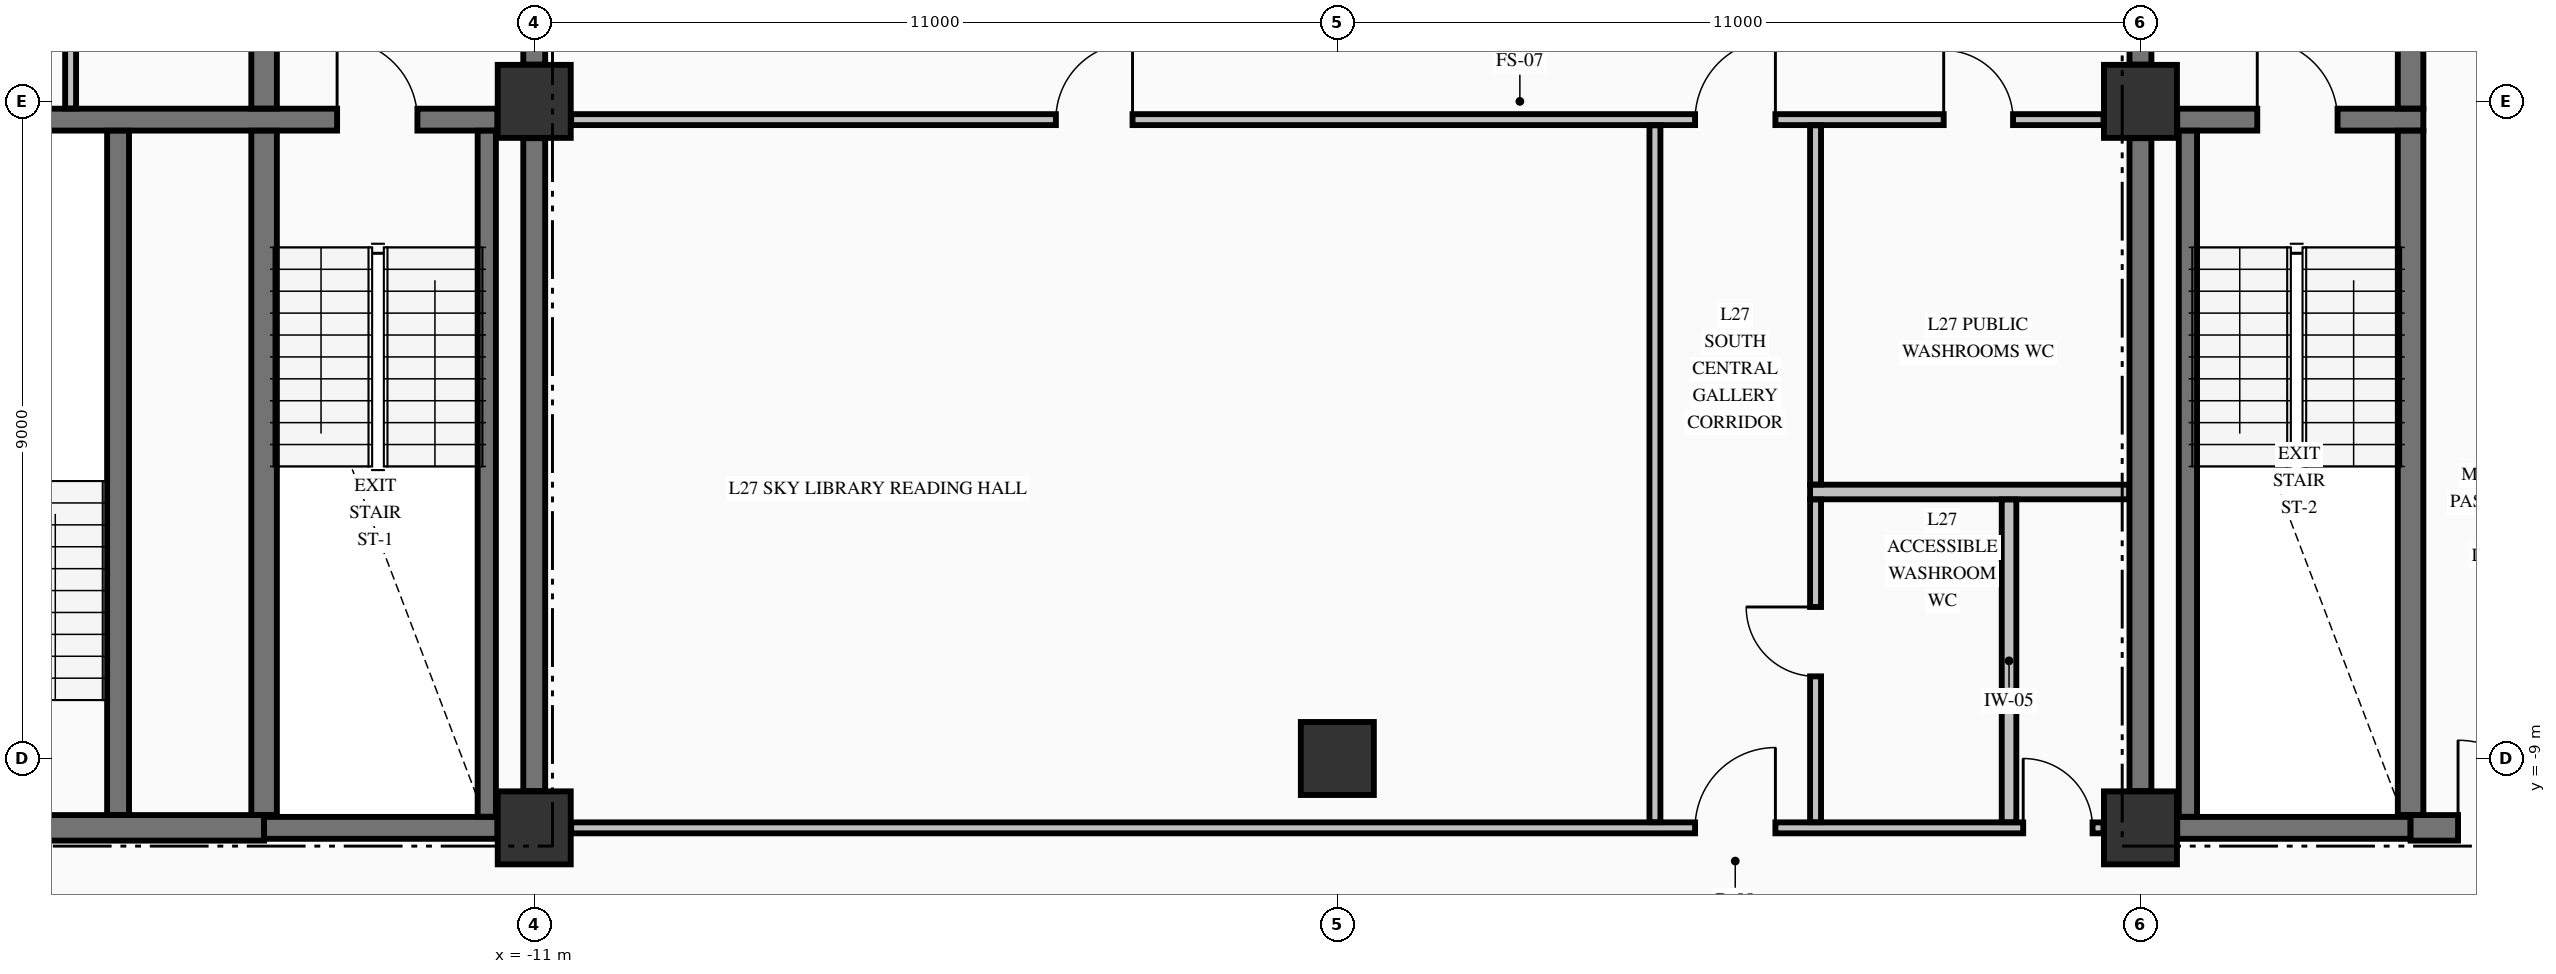
"""IFC4 building model, lengths in metres.
Left out: names, types, materials, properties, quantities, classifications, styles, units other than length and angle.
Written with IfcOpenShell. Run it as: python <this file> out.ifc"""

import sys

from ifc_helpers import new_model, si_unit, direction, frame, frame_2d, origin, origin_2d, place, context, subcontext, project, spatial, rectangle, extrude, element, fill, save


model = new_model("IFC4")
c1 = context("Model", 3, precision=1e-05, world=origin(), true_north=direction((0.0, 1.0)))
c2 = subcontext(c1, "Body", "Model", "MODEL_VIEW")
j1 = project(units=[si_unit("LENGTHUNIT", "METRE"), si_unit("PLANEANGLEUNIT", "RADIAN")], contexts=[c1])
p1 = place(None, origin())
s1 = spatial("IfcSite", under=j1, at=p1, CompositionType="ELEMENT")
p2 = place(p1, origin())
s2 = spatial("IfcBuilding", under=s1, at=p2, CompositionType="ELEMENT")
p3 = place(p2, frame((0.0, 0.0, 109.21)))
s3 = spatial("IfcBuildingStorey", under=s2, at=p3, CompositionType="ELEMENT", Elevation=109.21)
for number, where, z_axis, x_axis in (
    (1, (-11.0, -9.95, -0.25), (0.0, 0.0, 1.0), (1.0, 0.0, 0.0)),
    (2, (-11.0, 0.0, -0.25), (0.0, 0.0, 1.0), (1.0, 0.0, 0.0)),
    (3, (11.0, -9.95, -0.25), (0.0, 0.0, 1.0), (1.0, 0.0, 0.0)),
    (4, (11.0, 0.0, -0.25), (0.0, 0.0, 1.0), (1.0, 0.0, 0.0)),
    (5, (0.0, -9.0, -0.25), (0.0, 0.0, 1.0), (1.0, 0.0, 0.0)),
):
    element("IfcColumn", number, at=place(p3, frame(where, z_axis=z_axis, x_axis=x_axis)), inside=s3, PredefinedType="COLUMN", context=c2, shape_type="SweptSolid", body=[
        extrude(rectangle(XDim=1.0, YDim=1.0, at=origin_2d()), origin(), (0.0, 0.0, 1.0), 3.57),
    ])
p4 = place(p3, frame((-19.496, -9.95, 0.0), z_axis=(0.0, 0.0, 1.0), x_axis=(1.0, 0.0, 0.0)))
e6 = element("IfcWall", 6, at=p4, inside=s3, PredefinedType="SHEAR", context=c2, shape_type="SweptSolid", body=[
    extrude(rectangle(XDim=4.796, YDim=0.35, at=frame_2d((2.398, 0.0))), origin(), (0.0, 0.0, 1.0), 3.32),
])
p5 = place(p4, frame((0.671, 0.0, 0.0)))
e7 = element("IfcOpeningElement", 7, at=p5, cuts=e6, PredefinedType="OPENING", context=c2, shape_type="SweptSolid", body=[
    extrude(rectangle(XDim=1.05, YDim=2.15, at=frame_2d((0.525, 1.075))), frame((0.0, 0.185, 0.0), z_axis=(0.0, -1.0, 0.0), x_axis=(1.0, 0.0, 0.0)), (0.0, 0.0, 1.0), 0.37),
])
for number, where, z_axis, x_axis in (
    (8, (-14.7, -9.95, 0.0), (0.0, 0.0, 1.0), (1.0, 0.0, 0.0)),
    (9, (11.504, -9.95, 0.0), (0.0, 0.0, 1.0), (1.0, 0.0, 0.0)),
):
    element("IfcWall", number, at=place(p3, frame(where, z_axis=z_axis, x_axis=x_axis)), inside=s3, PredefinedType="SHEAR", context=c2, shape_type="SweptSolid", body=[
        extrude(rectangle(XDim=3.196, YDim=0.3, at=frame_2d((1.598, 0.0))), origin(), (0.0, 0.0, 1.0), 3.32),
    ])
p6 = place(p3, frame((14.7, -9.95, 0.0), z_axis=(0.0, 0.0, 1.0), x_axis=(1.0, 0.0, 0.0)))
e10 = element("IfcWall", 10, at=p6, inside=s3, PredefinedType="SHEAR", context=c2, shape_type="SweptSolid", body=[
    extrude(rectangle(XDim=4.796, YDim=0.35, at=frame_2d((2.398, 0.0))), origin(), (0.0, 0.0, 1.0), 3.32),
])
p7 = place(p6, frame((0.65, 0.0, 0.0)))
e11 = element("IfcOpeningElement", 11, at=p7, cuts=e10, PredefinedType="OPENING", context=c2, shape_type="SweptSolid", body=[
    extrude(rectangle(XDim=1.2, YDim=2.15, at=frame_2d((0.6, 1.075))), frame((0.0, 0.185, 0.0), z_axis=(0.0, -1.0, 0.0), x_axis=(1.0, 0.0, 0.0)), (0.0, 0.0, 1.0), 0.37),
])
p8 = place(p3, frame((-19.496, -0.25, 0.0), z_axis=(0.0, 0.0, 1.0), x_axis=(1.0, 0.0, 0.0)))
e12 = element("IfcWall", 12, at=p8, inside=s3, PredefinedType="SHEAR", context=c2, shape_type="SweptSolid", body=[
    extrude(rectangle(XDim=7.992, YDim=0.3, at=frame_2d((3.996, 0.0))), origin(), (0.0, 0.0, 1.0), 3.32),
])
p9 = place(p8, frame((5.796, 0.0, 0.0)))
e13 = element("IfcOpeningElement", 13, at=p9, cuts=e12, PredefinedType="OPENING", context=c2, shape_type="SweptSolid", body=[
    extrude(rectangle(XDim=1.1, YDim=2.15, at=frame_2d((0.55, 1.075))), frame((0.0, 0.16, 0.0), z_axis=(0.0, -1.0, 0.0), x_axis=(1.0, 0.0, 0.0)), (0.0, 0.0, 1.0), 0.32),
])
p10 = place(p3, frame((11.504, -0.25, 0.0), z_axis=(0.0, 0.0, 1.0), x_axis=(1.0, 0.0, 0.0)))
e14 = element("IfcWall", 14, at=p10, inside=s3, PredefinedType="SHEAR", context=c2, shape_type="SweptSolid", body=[
    extrude(rectangle(XDim=3.371, YDim=0.3, at=frame_2d((1.686, 0.0))), origin(), (0.0, 0.0, 1.0), 3.32),
])
p11 = place(p10, frame((1.096, 0.0, 0.0)))
e15 = element("IfcOpeningElement", 15, at=p11, cuts=e14, PredefinedType="OPENING", context=c2, shape_type="SweptSolid", body=[
    extrude(rectangle(XDim=1.1, YDim=2.15, at=frame_2d((0.55, 1.075))), frame((0.0, 0.16, 0.0), z_axis=(0.0, -1.0, 0.0), x_axis=(1.0, 0.0, 0.0)), (0.0, 0.0, 1.0), 0.32),
])
p12 = place(p3, frame((-10.494, -9.95, 0.0), z_axis=(0.0, 0.0, 1.0), x_axis=(1.0, 0.0, 0.0)))
e16 = element("IfcWall", 16, at=p12, inside=s3, PredefinedType="PARTITIONING", context=c2, shape_type="SweptSolid", body=[
    extrude(rectangle(XDim=20.988, YDim=0.15, at=frame_2d((10.494, 0.0))), origin(), (0.0, 0.0, 1.0), 3.32),
])
p13 = place(p12, frame((15.394, 0.0, 0.0)))
e17 = element("IfcOpeningElement", 17, at=p13, cuts=e16, PredefinedType="OPENING", context=c2, shape_type="SweptSolid", body=[
    extrude(rectangle(XDim=1.1, YDim=2.15, at=frame_2d((0.55, 1.075))), frame((0.0, 0.085, 0.0), z_axis=(0.0, -1.0, 0.0), x_axis=(1.0, 0.0, 0.0)), (0.0, 0.0, 1.0), 0.17),
])
p14 = place(p12, frame((19.888, 0.0, 0.0)))
e18 = element("IfcOpeningElement", 18, at=p14, cuts=e16, PredefinedType="OPENING", context=c2, shape_type="SweptSolid", body=[
    extrude(rectangle(XDim=0.95, YDim=2.15, at=frame_2d((0.475, 1.075))), frame((0.0, 0.085, 0.0), z_axis=(0.0, -1.0, 0.0), x_axis=(1.0, 0.0, 0.0)), (0.0, 0.0, 1.0), 0.17),
])
p15 = place(p3, frame((6.475, -5.35, 0.0), z_axis=(0.0, 0.0, 1.0), x_axis=(1.0, 0.0, 0.0)))
e19 = element("IfcWall", 19, at=p15, inside=s3, PredefinedType="PARTITIONING", context=c2, shape_type="SweptSolid", body=[
    extrude(rectangle(XDim=4.372, YDim=0.2, at=frame_2d((2.186, 0.0))), origin(), (0.0, 0.0, 1.0), 3.32),
])
p16 = place(p3, frame((-10.494, -0.25, 0.0), z_axis=(0.0, 0.0, 1.0), x_axis=(1.0, 0.0, 0.0)))
e20 = element("IfcWall", 20, at=p16, inside=s3, PredefinedType="PARTITIONING", context=c2, shape_type="SweptSolid", body=[
    extrude(rectangle(XDim=20.988, YDim=0.15, at=frame_2d((10.494, 0.0))), origin(), (0.0, 0.0, 1.0), 3.32),
])
p17 = place(p16, frame((15.394, 0.0, 0.0)))
e21 = element("IfcOpeningElement", 21, at=p17, cuts=e20, PredefinedType="OPENING", context=c2, shape_type="SweptSolid", body=[
    extrude(rectangle(XDim=1.1, YDim=2.15, at=frame_2d((0.55, 1.075))), frame((0.0, 0.085, 0.0), z_axis=(0.0, -1.0, 0.0), x_axis=(1.0, 0.0, 0.0)), (0.0, 0.0, 1.0), 0.17),
])
p18 = place(p16, frame((6.639, 0.0, 0.0)))
e22 = element("IfcOpeningElement", 22, at=p18, cuts=e20, PredefinedType="OPENING", context=c2, shape_type="SweptSolid", body=[
    extrude(rectangle(XDim=1.05, YDim=2.15, at=frame_2d((0.525, 1.075))), frame((0.0, 0.085, 0.0), z_axis=(0.0, -1.0, 0.0), x_axis=(1.0, 0.0, 0.0)), (0.0, 0.0, 1.0), 0.17),
])
p19 = place(p16, frame((18.799, 0.0, 0.0)))
e23 = element("IfcOpeningElement", 23, at=p19, cuts=e20, PredefinedType="OPENING", context=c2, shape_type="SweptSolid", body=[
    extrude(rectangle(XDim=0.95, YDim=2.15, at=frame_2d((0.475, 1.075))), frame((0.0, 0.085, 0.0), z_axis=(0.0, -1.0, 0.0), x_axis=(1.0, 0.0, 0.0)), (0.0, 0.0, 1.0), 0.17),
])
p20 = place(p3, frame((-16.7, -9.773, 0.0), z_axis=(0.0, 0.0, 1.0), x_axis=(0.0, 1.0, 0.0)))
e24 = element("IfcWall", 24, at=p20, inside=s3, PredefinedType="SHEAR", context=c2, shape_type="SweptSolid", body=[
    extrude(rectangle(XDim=9.371, YDim=0.3, at=frame_2d((4.686, 0.0))), origin(), (0.0, 0.0, 1.0), 3.32),
])
p21 = place(p3, frame((-14.7, -9.773, 0.0), z_axis=(0.0, 0.0, 1.0), x_axis=(0.0, 1.0, 0.0)))
e25 = element("IfcWall", 25, at=p21, inside=s3, PredefinedType="SHEAR", context=c2, shape_type="SweptSolid", body=[
    extrude(rectangle(XDim=9.371, YDim=0.35, at=frame_2d((4.686, 0.0))), origin(), (0.0, 0.0, 1.0), 3.32),
])
p22 = place(p3, frame((-14.7, -0.098, 0.0), z_axis=(0.0, 0.0, 1.0), x_axis=(0.0, 1.0, 0.0)))
e26 = element("IfcWall", 26, at=p22, inside=s3, PredefinedType="SHEAR", context=c2, shape_type="SweptSolid", body=[
    extrude(rectangle(XDim=2.846, YDim=0.35, at=frame_2d((1.423, 0.0))), origin(), (0.0, 0.0, 1.0), 3.32),
])
p23 = place(p3, frame((-11.65, -9.798, 0.0), z_axis=(0.0, 0.0, 1.0), x_axis=(0.0, 1.0, 0.0)))
e27 = element("IfcWall", 27, at=p23, inside=s3, PredefinedType="SOLIDWALL", context=c2, shape_type="SweptSolid", body=[
    extrude(rectangle(XDim=9.396, YDim=0.25, at=frame_2d((4.698, 0.0))), origin(), (0.0, 0.0, 1.0), 3.32),
])
p24 = place(p3, frame((-11.0, -9.446, 0.0), z_axis=(0.0, 0.0, 1.0), x_axis=(0.0, 1.0, 0.0)))
e28 = element("IfcWall", 28, at=p24, inside=s3, PredefinedType="SHEAR", context=c2, shape_type="SweptSolid", body=[
    extrude(rectangle(XDim=8.942, YDim=0.3, at=frame_2d((4.471, 0.0))), origin(), (0.0, 0.0, 1.0), 3.32),
])
p25 = place(p3, frame((-11.0, 0.504, 0.0), z_axis=(0.0, 0.0, 1.0), x_axis=(0.0, 1.0, 0.0)))
e29 = element("IfcWall", 29, at=p25, inside=s3, PredefinedType="SHEAR", context=c2, shape_type="SweptSolid", body=[
    extrude(rectangle(XDim=2.244, YDim=0.3, at=frame_2d((1.122, 0.0))), origin(), (0.0, 0.0, 1.0), 3.32),
])
p26 = place(p25, frame((0.596, 0.0, 0.0)))
e30 = element("IfcOpeningElement", 30, at=p26, cuts=e29, PredefinedType="OPENING", context=c2, shape_type="SweptSolid", body=[
    extrude(rectangle(XDim=1.1, YDim=2.15, at=frame_2d((0.55, 1.075))), frame((0.0, 0.16, 0.0), z_axis=(0.0, -1.0, 0.0), x_axis=(1.0, 0.0, 0.0)), (0.0, 0.0, 1.0), 0.32),
])
p27 = place(p3, frame((11.0, -9.446, 0.0), z_axis=(0.0, 0.0, 1.0), x_axis=(0.0, 1.0, 0.0)))
e31 = element("IfcWall", 31, at=p27, inside=s3, PredefinedType="SHEAR", context=c2, shape_type="SweptSolid", body=[
    extrude(rectangle(XDim=8.942, YDim=0.3, at=frame_2d((4.471, 0.0))), origin(), (0.0, 0.0, 1.0), 3.32),
])
p28 = place(p3, frame((11.0, 0.504, 0.0), z_axis=(0.0, 0.0, 1.0), x_axis=(0.0, 1.0, 0.0)))
e32 = element("IfcWall", 32, at=p28, inside=s3, PredefinedType="SHEAR", context=c2, shape_type="SweptSolid", body=[
    extrude(rectangle(XDim=2.244, YDim=0.3, at=frame_2d((1.122, 0.0))), origin(), (0.0, 0.0, 1.0), 3.32),
])
p29 = place(p28, frame((0.596, 0.0, 0.0)))
e33 = element("IfcOpeningElement", 33, at=p29, cuts=e32, PredefinedType="OPENING", context=c2, shape_type="SweptSolid", body=[
    extrude(rectangle(XDim=1.1, YDim=2.15, at=frame_2d((0.55, 1.075))), frame((0.0, 0.16, 0.0), z_axis=(0.0, -1.0, 0.0), x_axis=(1.0, 0.0, 0.0)), (0.0, 0.0, 1.0), 0.32),
])
p30 = place(p3, frame((11.65, -9.798, 0.0), z_axis=(0.0, 0.0, 1.0), x_axis=(0.0, 1.0, 0.0)))
e34 = element("IfcWall", 34, at=p30, inside=s3, PredefinedType="SOLIDWALL", context=c2, shape_type="SweptSolid", body=[
    extrude(rectangle(XDim=9.396, YDim=0.25, at=frame_2d((4.698, 0.0))), origin(), (0.0, 0.0, 1.0), 3.32),
])
p31 = place(p3, frame((14.7, -9.773, 0.0), z_axis=(0.0, 0.0, 1.0), x_axis=(0.0, 1.0, 0.0)))
e35 = element("IfcWall", 35, at=p31, inside=s3, PredefinedType="SHEAR", context=c2, shape_type="SweptSolid", body=[
    extrude(rectangle(XDim=9.371, YDim=0.35, at=frame_2d((4.686, 0.0))), origin(), (0.0, 0.0, 1.0), 3.32),
])
p32 = place(p3, frame((14.7, -0.098, 0.0), z_axis=(0.0, 0.0, 1.0), x_axis=(0.0, 1.0, 0.0)))
e36 = element("IfcWall", 36, at=p32, inside=s3, PredefinedType="SHEAR", context=c2, shape_type="SweptSolid", body=[
    extrude(rectangle(XDim=2.846, YDim=0.35, at=frame_2d((1.423, 0.0))), origin(), (0.0, 0.0, 1.0), 3.32),
])
p33 = place(p3, frame((-17.35, -0.097, 0.0), z_axis=(0.0, 0.0, 1.0), x_axis=(0.0, 1.0, 0.0)))
e37 = element("IfcWall", 37, at=p33, inside=s3, PredefinedType="PARTITIONING", context=c2, shape_type="SweptSolid", body=[
    extrude(rectangle(XDim=10.419, YDim=0.15, at=frame_2d((5.209, 0.0))), origin(), (0.0, 0.0, 1.0), 3.32),
])
p34 = place(p3, frame((4.35, -9.872, 0.0), z_axis=(0.0, 0.0, 1.0), x_axis=(0.0, 1.0, 0.0)))
e38 = element("IfcWall", 38, at=p34, inside=s3, PredefinedType="PARTITIONING", context=c2, shape_type="SweptSolid", body=[
    extrude(rectangle(XDim=9.544, YDim=0.15, at=frame_2d((4.772, 0.0))), origin(), (0.0, 0.0, 1.0), 3.32),
])
p35 = place(p3, frame((6.55, -9.872, 0.0), z_axis=(0.0, 0.0, 1.0), x_axis=(0.0, 1.0, 0.0)))
e39 = element("IfcWall", 39, at=p35, inside=s3, PredefinedType="PARTITIONING", context=c2, shape_type="SweptSolid", body=[
    extrude(rectangle(XDim=4.419, YDim=0.15, at=frame_2d((2.209, 0.0))), origin(), (0.0, 0.0, 1.0), 3.32),
])
p36 = place(p35, frame((1.997, 0.0, 0.0)))
e40 = element("IfcOpeningElement", 40, at=p36, cuts=e39, PredefinedType="OPENING", context=c2, shape_type="SweptSolid", body=[
    extrude(rectangle(XDim=0.95, YDim=2.15, at=frame_2d((0.475, 1.075))), frame((0.0, 0.085, 0.0), z_axis=(0.0, -1.0, 0.0), x_axis=(1.0, 0.0, 0.0)), (0.0, 0.0, 1.0), 0.17),
])
p37 = place(p3, frame((6.55, -5.247, 0.0), z_axis=(0.0, 0.0, 1.0), x_axis=(0.0, 1.0, 0.0)))
e41 = element("IfcWall", 41, at=p37, inside=s3, PredefinedType="PARTITIONING", context=c2, shape_type="SweptSolid", body=[
    extrude(rectangle(XDim=4.919, YDim=0.15, at=frame_2d((2.459, 0.0))), origin(), (0.0, 0.0, 1.0), 3.32),
])
p38 = place(p3, frame((9.2, -9.872, 0.0), z_axis=(0.0, 0.0, 1.0), x_axis=(0.0, 1.0, 0.0)))
e42 = element("IfcWall", 42, at=p38, inside=s3, PredefinedType="PARTITIONING", context=c2, shape_type="SweptSolid", body=[
    extrude(rectangle(XDim=4.419, YDim=0.2, at=frame_2d((2.209, 0.0))), origin(), (0.0, 0.0, 1.0), 3.32),
])
p39 = place(p9, origin())
e43 = element("IfcDoor", 43, at=p39, inside=s3, OperationType="SINGLE_SWING_LEFT", PredefinedType="DOOR", context=c2, shape_type="SweptSolid", body=[
    extrude(rectangle(XDim=1.1, YDim=2.15, at=frame_2d((0.55, 1.075))), frame((0.0, 0.025, 0.0), z_axis=(0.0, -1.0, 0.0), x_axis=(1.0, 0.0, 0.0)), (0.0, 0.0, 1.0), 0.05),
])
fill(e13, e43)
p40 = place(p11, origin())
e44 = element("IfcDoor", 44, at=p40, inside=s3, OperationType="SINGLE_SWING_LEFT", PredefinedType="DOOR", context=c2, shape_type="SweptSolid", body=[
    extrude(rectangle(XDim=1.1, YDim=2.15, at=frame_2d((0.55, 1.075))), frame((0.0, 0.025, 0.0), z_axis=(0.0, -1.0, 0.0), x_axis=(1.0, 0.0, 0.0)), (0.0, 0.0, 1.0), 0.05),
])
fill(e15, e44)
p41 = place(p7, origin())
e45 = element("IfcDoor", 45, at=p41, inside=s3, OperationType="SINGLE_SWING_LEFT", PredefinedType="DOOR", context=c2, shape_type="SweptSolid", body=[
    extrude(rectangle(XDim=1.2, YDim=2.15, at=frame_2d((0.6, 1.075))), frame((0.0, 0.025, 0.0), z_axis=(0.0, -1.0, 0.0), x_axis=(1.0, 0.0, 0.0)), (0.0, 0.0, 1.0), 0.05),
])
fill(e11, e45)
p42 = place(p13, origin())
e46 = element("IfcDoor", 46, at=p42, inside=s3, OperationType="SINGLE_SWING_RIGHT", PredefinedType="DOOR", context=c2, shape_type="SweptSolid", body=[
    extrude(rectangle(XDim=1.1, YDim=2.15, at=frame_2d((0.55, 1.075))), frame((0.0, 0.025, 0.0), z_axis=(0.0, -1.0, 0.0), x_axis=(1.0, 0.0, 0.0)), (0.0, 0.0, 1.0), 0.05),
])
fill(e17, e46)
p43 = place(p17, origin())
e47 = element("IfcDoor", 47, at=p43, inside=s3, OperationType="SINGLE_SWING_RIGHT", PredefinedType="DOOR", context=c2, shape_type="SweptSolid", body=[
    extrude(rectangle(XDim=1.1, YDim=2.15, at=frame_2d((0.55, 1.075))), frame((0.0, 0.025, 0.0), z_axis=(0.0, -1.0, 0.0), x_axis=(1.0, 0.0, 0.0)), (0.0, 0.0, 1.0), 0.05),
])
fill(e21, e47)
p44 = place(p18, origin())
e48 = element("IfcDoor", 48, at=p44, inside=s3, OperationType="SINGLE_SWING_RIGHT", PredefinedType="DOOR", context=c2, shape_type="SweptSolid", body=[
    extrude(rectangle(XDim=1.05, YDim=2.15, at=frame_2d((0.525, 1.075))), frame((0.0, 0.025, 0.0), z_axis=(0.0, -1.0, 0.0), x_axis=(1.0, 0.0, 0.0)), (0.0, 0.0, 1.0), 0.05),
])
fill(e22, e48)
p45 = place(p19, origin())
e49 = element("IfcDoor", 49, at=p45, inside=s3, OperationType="SINGLE_SWING_LEFT", PredefinedType="DOOR", context=c2, shape_type="SweptSolid", body=[
    extrude(rectangle(XDim=0.95, YDim=2.15, at=frame_2d((0.475, 1.075))), frame((0.0, 0.025, 0.0), z_axis=(0.0, -1.0, 0.0), x_axis=(1.0, 0.0, 0.0)), (0.0, 0.0, 1.0), 0.05),
])
fill(e23, e49)
p46 = place(p36, origin())
e50 = element("IfcDoor", 50, at=p46, inside=s3, OperationType="SINGLE_SWING_RIGHT", PredefinedType="DOOR", context=c2, shape_type="SweptSolid", body=[
    extrude(rectangle(XDim=0.95, YDim=2.15, at=frame_2d((0.475, 1.075))), frame((0.0, 0.025, 0.0), z_axis=(0.0, -1.0, 0.0), x_axis=(1.0, 0.0, 0.0)), (0.0, 0.0, 1.0), 0.05),
])
fill(e40, e50)
p47 = place(p14, origin())
e51 = element("IfcDoor", 51, at=p47, inside=s3, OperationType="SINGLE_SWING_LEFT", PredefinedType="DOOR", context=c2, shape_type="SweptSolid", body=[
    extrude(rectangle(XDim=0.95, YDim=2.15, at=frame_2d((0.475, 1.075))), frame((0.0, 0.025, 0.0), z_axis=(0.0, -1.0, 0.0), x_axis=(1.0, 0.0, 0.0)), (0.0, 0.0, 1.0), 0.05),
])
fill(e18, e51)
save(model, sys.argv[1])
